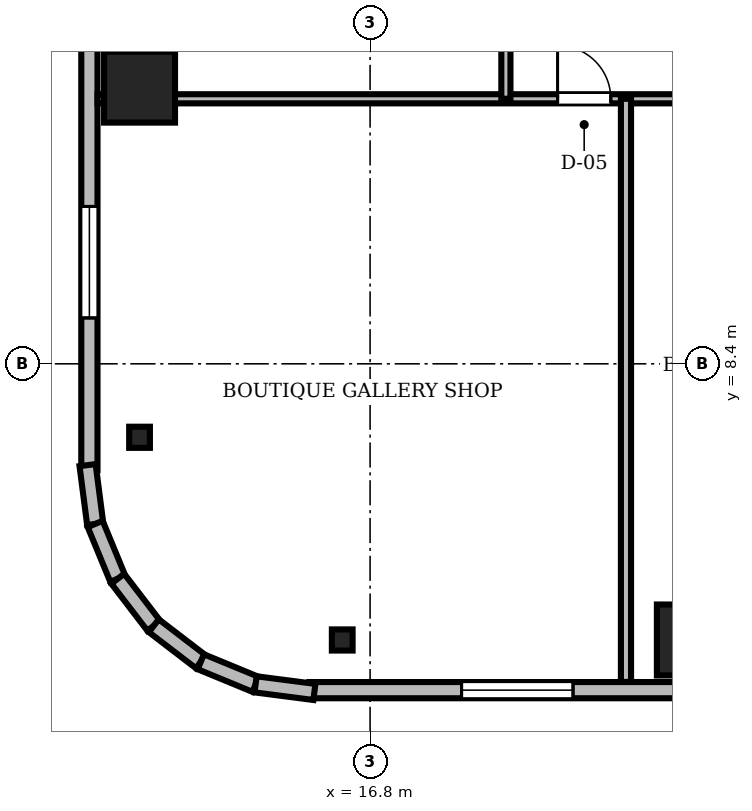
"""IFC4 building model, lengths in metres.
Left out: names, types, materials, properties, quantities, classifications, styles, units other than length and angle.
Written with IfcOpenShell. Run it as: python <this file> out.ifc"""

import sys

from ifc_helpers import new_model, si_unit, direction, frame, frame_2d, origin, origin_2d, place, context, subcontext, project, spatial, rectangle, i_section, extrude, source, transform, mapped, element, fill, save


model = new_model("IFC4")
c1 = context("Model", 3, precision=1e-05, world=origin(), true_north=direction((0.0, 1.0)))
c2 = subcontext(c1, "Body", "Model", "MODEL_VIEW")
j1 = project(units=[si_unit("LENGTHUNIT", "METRE"), si_unit("PLANEANGLEUNIT", "RADIAN")], contexts=[c1])
p1 = place(None, origin())
s1 = spatial("IfcSite", under=j1, at=p1, CompositionType="ELEMENT")
p2 = place(p1, origin())
s2 = spatial("IfcBuilding", under=s1, at=p2, CompositionType="ELEMENT")
p3 = place(p2, frame((0.0, 0.0, 199.8)))
s3 = spatial("IfcBuildingStorey", under=s2, at=p3, CompositionType="ELEMENT", Elevation=199.8)
m1 = source(origin(), c2, "Body", "SweptSolid", [
    extrude(rectangle(XDim=1.4, YDim=1.4, at=origin_2d()), origin(), (0.0, 0.0, 1.0), 3.53),
])
for number, where, z_axis, x_axis in (
    (1, (23.16, 2.95, 0.0), (0.0, 0.0, 1.0), (1.0, 0.0, 0.0)),
    (2, (12.25, 13.86, 0.0), (0.0, 0.0, 1.0), (1.0, 0.0, 0.0)),
):
    element("IfcColumn", number, at=place(p3, frame(where, z_axis=z_axis, x_axis=x_axis)), inside=s3, PredefinedType="COLUMN", context=c2, shape_type="MappedRepresentation", body=[
        mapped(m1, transform((0.0, 0.0, 0.0), scale=1.0)),
    ])
m2 = source(origin(), c2, "Body", "SweptSolid", [
    extrude(i_section(OverallWidth=0.409, OverallDepth=0.417, WebThickness=0.021, FlangeThickness=0.033, FilletRadius=0.015, at=origin_2d()), origin(), (0.0, 0.0, 1.0), 3.53),
])
for number, where, z_axis, x_axis in (
    (3, (16.25, 2.95, 0.0), (0.0, 0.0, 1.0), (1.0, 0.0, 0.0)),
    (4, (12.25, 6.95, 0.0), (0.0, 0.0, 1.0), (1.0, 0.0, 0.0)),
):
    element("IfcColumn", number, at=place(p3, frame(where, z_axis=z_axis, x_axis=x_axis)), inside=s3, PredefinedType="COLUMN", context=c2, shape_type="MappedRepresentation", body=[
        mapped(m2, transform((0.0, 0.0, 0.0), scale=1.0)),
    ])
m3 = source(origin(), c2, "Body", "SweptSolid", [
    extrude(rectangle(XDim=15.6, YDim=0.32, at=frame_2d((7.8, 0.0))), origin(), (0.0, 0.0, 1.0), 3.53),
])
p4 = place(p3, frame((15.6, 1.96, 0.0), z_axis=(0.0, 0.0, 1.0), x_axis=(1.0, 0.0, 0.0)))
e5 = element("IfcWall", 5, at=p4, inside=s3, PredefinedType="SOLIDWALL", context=c2, shape_type="MappedRepresentation", body=[
    mapped(m3, transform((0.0, 0.0, 0.0), scale=1.0)),
])
m4 = source(origin(), c2, "Body", "SweptSolid", [
    extrude(rectangle(XDim=2.2, YDim=2.4, at=frame_2d((1.1, 1.2))), frame((0.0, 0.17, 0.0), z_axis=(0.0, -1.0, 0.0), x_axis=(1.0, 0.0, 0.0)), (0.0, 0.0, 1.0), 0.34),
])
p5 = place(p4, frame((3.005, 0.0, 0.72)))
e6 = element("IfcOpeningElement", 6, at=p5, cuts=e5, PredefinedType="OPENING", context=c2, shape_type="MappedRepresentation", body=[
    mapped(m4, transform((0.0, 0.0, 0.0), scale=1.0)),
])
p6 = place(p3, frame((11.26, 21.9, 0.0), z_axis=(0.0, 0.0, 1.0), x_axis=(0.0, -1.0, 0.0)))
e7 = element("IfcWall", 7, at=p6, inside=s3, PredefinedType="SOLIDWALL", context=c2, shape_type="MappedRepresentation", body=[
    mapped(m3, transform((0.0, 0.0, 0.0), scale=1.0)),
])
m5 = source(origin(), c2, "Body", "SweptSolid", [
    extrude(rectangle(XDim=1.4, YDim=2.3, at=frame_2d((0.7, 1.15))), frame((0.0, 0.17, 0.0), z_axis=(0.0, -1.0, 0.0), x_axis=(1.0, 0.0, 0.0)), (0.0, 0.0, 1.0), 0.34),
])
p7 = place(p6, frame((4.59, 0.0, 0.0)))
e8 = element("IfcOpeningElement", 8, at=p7, cuts=e7, PredefinedType="OPENING", context=c2, shape_type="MappedRepresentation", body=[
    mapped(m5, transform((0.0, 0.0, 0.0), scale=1.0)),
])
p8 = place(p6, frame((10.395, 0.0, 0.72)))
e9 = element("IfcOpeningElement", 9, at=p8, cuts=e7, PredefinedType="OPENING", context=c2, shape_type="MappedRepresentation", body=[
    mapped(m4, transform((0.0, 0.0, 0.0), scale=1.0)),
])
m6 = source(origin(), c2, "Body", "SweptSolid", [
    extrude(rectangle(XDim=1.171, YDim=0.32, at=frame_2d((0.585, 0.0))), origin(), (0.0, 0.0, 1.0), 3.53),
])
p9 = place(p3, frame((11.224, 6.401, 0.0), z_axis=(0.0, 0.0, 1.0), x_axis=(0.128269133229, -0.991739395941, 0.0)))
e10 = element("IfcWall", 10, at=p9, inside=s3, PredefinedType="SOLIDWALL", context=c2, shape_type="MappedRepresentation", body=[
    mapped(m6, transform((0.0, 0.0, 0.0), scale=1.0)),
])
m7 = source(origin(), c2, "Body", "SweptSolid", [
    extrude(rectangle(XDim=1.169, YDim=0.32, at=frame_2d((0.584, 0.0))), origin(), (0.0, 0.0, 1.0), 3.53),
])
for number, where, z_axis, x_axis in (
    (11, (11.375, 5.24, 0.0), (0.0, 0.0, 1.0), (0.381, -0.925, 0.0)),
    (12, (11.82, 4.159, 0.0), (0.0, 0.0, 1.0), (0.608, -0.794, 0.0)),
):
    element("IfcWall", number, at=place(p3, frame(where, z_axis=z_axis, x_axis=x_axis)), inside=s3, PredefinedType="SOLIDWALL", context=c2, shape_type="MappedRepresentation", body=[
        mapped(m7, transform((0.0, 0.0, 0.0), scale=1.0)),
    ])
m8 = source(origin(), c2, "Body", "SweptSolid", [
    extrude(rectangle(XDim=1.169, YDim=0.32, at=frame_2d((0.584, 0.0))), origin(), (0.0, 0.0, 1.0), 3.53),
])
p10 = place(p3, frame((12.531, 3.231, 0.0), z_axis=(0.0, 0.0, 1.0), x_axis=(0.793663520347, -0.608356981114, 0.0)))
e13 = element("IfcWall", 13, at=p10, inside=s3, PredefinedType="SOLIDWALL", context=c2, shape_type="MappedRepresentation", body=[
    mapped(m8, transform((0.0, 0.0, 0.0), scale=1.0)),
])
m9 = source(origin(), c2, "Body", "SweptSolid", [
    extrude(rectangle(XDim=1.169, YDim=0.32, at=frame_2d((0.585, 0.0))), origin(), (0.0, 0.0, 1.0), 3.53),
])
p11 = place(p3, frame((13.459, 2.52, 0.0), z_axis=(0.0, 0.0, 1.0), x_axis=(0.924479075121, -0.381232789334, 0.0)))
e14 = element("IfcWall", 14, at=p11, inside=s3, PredefinedType="SOLIDWALL", context=c2, shape_type="MappedRepresentation", body=[
    mapped(m9, transform((0.0, 0.0, 0.0), scale=1.0)),
])
m10 = source(origin(), c2, "Body", "SweptSolid", [
    extrude(rectangle(XDim=1.17, YDim=0.32, at=frame_2d((0.585, 0.0))), origin(), (0.0, 0.0, 1.0), 3.53),
])
p12 = place(p3, frame((14.54, 2.074, 0.0), z_axis=(0.0, 0.0, 1.0), x_axis=(0.991762485493, -0.128090485085, 0.0)))
e15 = element("IfcWall", 15, at=p12, inside=s3, PredefinedType="SOLIDWALL", context=c2, shape_type="MappedRepresentation", body=[
    mapped(m10, transform((0.0, 0.0, 0.0), scale=1.0)),
])
m11 = source(origin(), c2, "Body", "SweptSolid", [
    extrude(rectangle(XDim=46.156, YDim=0.18, at=frame_2d((23.078, 0.0))), origin(), (0.0, 0.0, 1.0), 2.772),
])
p13 = place(p3, frame((11.422, 13.63, 0.0), z_axis=(0.0, 0.0, 1.0), x_axis=(1.0, 0.0, 0.0)))
e16 = element("IfcWall", 16, at=p13, inside=s3, PredefinedType="PARTITIONING", context=c2, shape_type="MappedRepresentation", body=[
    mapped(m11, transform((0.0, 0.0, 0.0), scale=1.0)),
])
m12 = source(origin(), c2, "Body", "SweptSolid", [
    extrude(rectangle(XDim=1.05, YDim=2.2, at=frame_2d((0.525, 1.1))), frame((0.0, 0.1, 0.0), z_axis=(0.0, -1.0, 0.0), x_axis=(1.0, 0.0, 0.0)), (0.0, 0.0, 1.0), 0.2),
])
p14 = place(p13, frame((9.078, 0.0, 0.0)))
e17 = element("IfcOpeningElement", 17, at=p14, cuts=e16, PredefinedType="OPENING", context=c2, shape_type="MappedRepresentation", body=[
    mapped(m12, transform((0.0, 0.0, 0.0), scale=1.0)),
])
p15 = place(p13, frame((11.755, 0.0, 0.0)))
e18 = element("IfcOpeningElement", 18, at=p15, cuts=e16, PredefinedType="OPENING", context=c2, shape_type="MappedRepresentation", body=[
    mapped(m12, transform((0.0, 0.0, 0.0), scale=1.0)),
])
p16 = place(p13, frame((16.199, 0.0, 0.0)))
e19 = element("IfcOpeningElement", 19, at=p16, cuts=e16, PredefinedType="OPENING", context=c2, shape_type="MappedRepresentation", body=[
    mapped(m12, transform((0.0, 0.0, 0.0), scale=1.0)),
])
p17 = place(p13, frame((21.393, 0.0, 0.0)))
e20 = element("IfcOpeningElement", 20, at=p17, cuts=e16, PredefinedType="OPENING", context=c2, shape_type="MappedRepresentation", body=[
    mapped(m12, transform((0.0, 0.0, 0.0), scale=1.0)),
])
m13 = source(origin(), c2, "Body", "SweptSolid", [
    extrude(rectangle(XDim=0.95, YDim=2.15, at=frame_2d((0.475, 1.075))), frame((0.0, 0.1, 0.0), z_axis=(0.0, -1.0, 0.0), x_axis=(1.0, 0.0, 0.0)), (0.0, 0.0, 1.0), 0.2),
])
p18 = place(p13, frame((27.812, 0.0, 0.0)))
e21 = element("IfcOpeningElement", 21, at=p18, cuts=e16, PredefinedType="OPENING", context=c2, shape_type="MappedRepresentation", body=[
    mapped(m13, transform((0.0, 0.0, 0.0), scale=1.0)),
])
p19 = place(p13, frame((32.531, 0.0, 0.0)))
e22 = element("IfcOpeningElement", 22, at=p19, cuts=e16, PredefinedType="OPENING", context=c2, shape_type="MappedRepresentation", body=[
    mapped(m12, transform((0.0, 0.0, 0.0), scale=1.0)),
])
p20 = place(p13, frame((37.498, 0.0, 0.0)))
e23 = element("IfcOpeningElement", 23, at=p20, cuts=e16, PredefinedType="OPENING", context=c2, shape_type="MappedRepresentation", body=[
    mapped(m12, transform((0.0, 0.0, 0.0), scale=1.0)),
])
m14 = source(origin(), c2, "Body", "SweptSolid", [
    extrude(rectangle(XDim=14.92, YDim=0.18, at=frame_2d((7.46, 0.0))), origin(), (0.0, 0.0, 1.0), 2.972),
])
p21 = place(p3, frame((19.48, 13.63, 0.0), z_axis=(0.0, 0.0, 1.0), x_axis=(0.0, 1.0, 0.0)))
e24 = element("IfcWall", 24, at=p21, inside=s3, PredefinedType="PARTITIONING", context=c2, shape_type="MappedRepresentation", body=[
    mapped(m14, transform((0.0, 0.0, 0.0), scale=1.0)),
])
p22 = place(p21, frame((1.942, 0.0, 0.0)))
e25 = element("IfcOpeningElement", 25, at=p22, cuts=e24, PredefinedType="OPENING", context=c2, shape_type="MappedRepresentation", body=[
    mapped(m12, transform((0.0, 0.0, 0.0), scale=1.0)),
])
p23 = place(p21, frame((8.09, 0.0, 0.0)))
e26 = element("IfcOpeningElement", 26, at=p23, cuts=e24, PredefinedType="OPENING", context=c2, shape_type="MappedRepresentation", body=[
    mapped(m13, transform((0.0, 0.0, 0.0), scale=1.0)),
])
p24 = place(p21, frame((11.788, 0.0, 0.0)))
e27 = element("IfcOpeningElement", 27, at=p24, cuts=e24, PredefinedType="OPENING", context=c2, shape_type="MappedRepresentation", body=[
    mapped(m12, transform((0.0, 0.0, 0.0), scale=1.0)),
])
m15 = source(origin(), c2, "Body", "SweptSolid", [
    extrude(rectangle(XDim=11.508, YDim=0.2, at=frame_2d((5.754, 0.0))), origin(), (0.0, 0.0, 1.0), 2.772),
])
p25 = place(p3, frame((21.85, 2.122, 0.0), z_axis=(0.0, 0.0, 1.0), x_axis=(0.0, 1.0, 0.0)))
e28 = element("IfcWall", 28, at=p25, inside=s3, PredefinedType="PARTITIONING", context=c2, shape_type="MappedRepresentation", body=[
    mapped(m15, transform((0.0, 0.0, 0.0), scale=1.0)),
])
m16 = source(origin(), c2, "Body", "SweptSolid", [
    extrude(rectangle(XDim=2.2, YDim=2.4, at=frame_2d((1.1, 1.2))), frame((0.0, 0.03, 0.0), z_axis=(0.0, -1.0, 0.0), x_axis=(1.0, 0.0, 0.0)), (0.0, 0.0, 1.0), 0.06),
])
p26 = place(p5, origin())
e29 = element("IfcWindow", 29, at=p26, inside=s3, PartitioningType="SINGLE_PANEL", PredefinedType="WINDOW", context=c2, shape_type="MappedRepresentation", body=[
    mapped(m16, transform((0.0, 0.0, 0.0), scale=1.0)),
])
fill(e6, e29)
p27 = place(p8, origin())
e30 = element("IfcWindow", 30, at=p27, inside=s3, PartitioningType="SINGLE_PANEL", PredefinedType="WINDOW", context=c2, shape_type="MappedRepresentation", body=[
    mapped(m16, transform((0.0, 0.0, 0.0), scale=1.0)),
])
fill(e9, e30)
m17 = source(origin(), c2, "Body", "SweptSolid", [
    extrude(rectangle(XDim=1.05, YDim=2.2, at=frame_2d((0.525, 1.1))), frame((0.0, 0.025, 0.0), z_axis=(0.0, -1.0, 0.0), x_axis=(1.0, 0.0, 0.0)), (0.0, 0.0, 1.0), 0.05),
])
p28 = place(p14, origin())
e31 = element("IfcDoor", 31, at=p28, inside=s3, OperationType="SINGLE_SWING_LEFT", PredefinedType="DOOR", context=c2, shape_type="MappedRepresentation", body=[
    mapped(m17, transform((0.0, 0.0, 0.0), scale=1.0)),
])
fill(e17, e31)
save(model, sys.argv[1])
